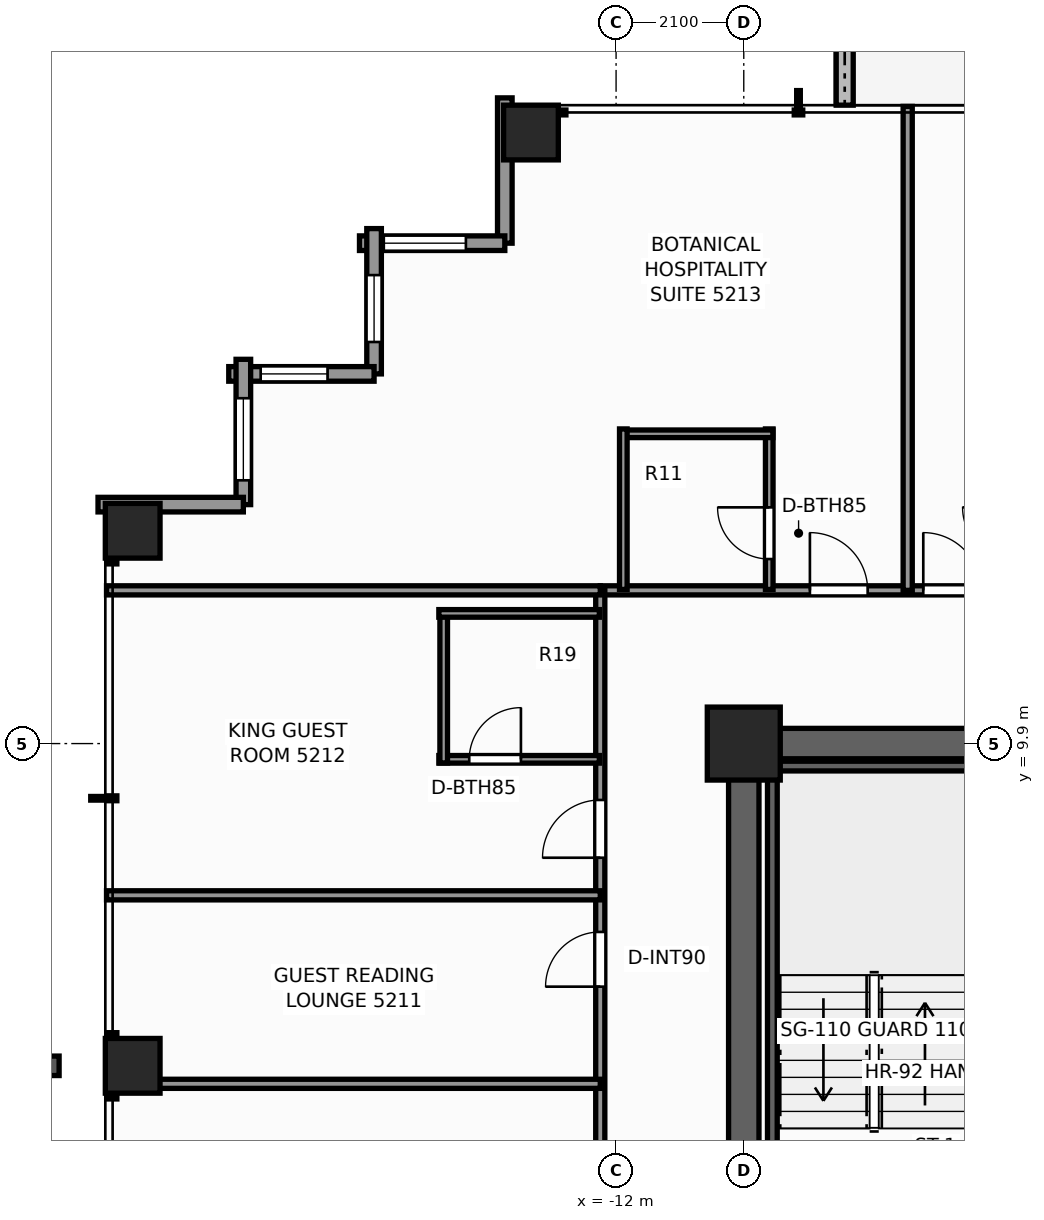
"""IFC4 building model, lengths in metres.
Left out: names, types, materials, properties, quantities, classifications, styles, units other than length and angle.
Written with IfcOpenShell. Run it as: python <this file> out.ifc"""

import sys

from ifc_helpers import new_model, si_unit, direction, frame, frame_2d, origin, origin_2d, place, context, subcontext, project, spatial, rectangle, extrude, element, fill, save


model = new_model("IFC4")
c1 = context("Model", 3, precision=1e-05, world=origin(), true_north=direction((0.0, 1.0)))
c2 = subcontext(c1, "Body", "Model", "MODEL_VIEW")
j1 = project(units=[si_unit("LENGTHUNIT", "METRE"), si_unit("PLANEANGLEUNIT", "RADIAN")], contexts=[c1])
p1 = place(None, origin())
s1 = spatial("IfcSite", under=j1, at=p1, CompositionType="ELEMENT")
p2 = place(p1, origin())
s2 = spatial("IfcBuilding", under=s1, at=p2, CompositionType="ELEMENT")
p3 = place(p2, frame((0.0, 0.0, 180.0)))
s3 = spatial("IfcBuildingStorey", under=s2, at=p3, CompositionType="ELEMENT", Elevation=180.0)
p4 = place(p3, frame((-10.15, 9.9, 0.0), z_axis=(0.0, 0.0, 1.0), x_axis=(1.0, 0.0, 0.0)))
e1 = element("IfcWall", 1, at=p4, inside=s3, PredefinedType="SHEAR", context=c2, shape_type="SweptSolid", body=[
    extrude(rectangle(XDim=14.57, YDim=0.5, at=frame_2d((7.285, 0.0))), origin(), (0.0, 0.0, 1.0), 3.3),
])
p5 = place(p3, frame((-9.9, -3.7, 0.0), z_axis=(0.0, 0.0, 1.0), x_axis=(0.0, 1.0, 0.0)))
e2 = element("IfcWall", 2, at=p5, inside=s3, PredefinedType="SHEAR", context=c2, shape_type="SweptSolid", body=[
    extrude(rectangle(XDim=13.35, YDim=0.5, at=frame_2d((6.675, 0.0))), origin(), (0.0, 0.0, 1.0), 3.3),
])
p6 = place(p5, frame((0.35, 0.0, 0.0)))
e3 = element("IfcOpeningElement", 3, at=p6, cuts=e2, PredefinedType="OPENING", context=c2, shape_type="SweptSolid", body=[
    extrude(rectangle(XDim=1.1, YDim=2.2, at=frame_2d((0.55, 1.1))), frame((0.0, 0.26, 0.0), z_axis=(0.0, -1.0, 0.0), x_axis=(1.0, 0.0, 0.0)), (0.0, 0.0, 1.0), 0.52),
])
p7 = place(p3, frame((-9.9, 9.9, 0.0), z_axis=(0.0, 0.0, 1.0), x_axis=(1.0, 0.0, 0.0)))
e4 = element("IfcColumn", 4, at=p7, inside=s3, PredefinedType="COLUMN", context=c2, shape_type="SweptSolid", body=[
    extrude(rectangle(XDim=1.2, YDim=1.2, at=origin_2d()), origin(), (0.0, 0.0, 1.0), 3.3),
])
for number, where, z_axis, x_axis in (
    (5, (-13.4, 19.95, 0.0), (0.0, 0.0, 1.0), (1.0, 0.0, 0.0)),
    (6, (-19.95, 4.6, 0.0), (0.0, 0.0, 1.0), (1.0, 0.0, 0.0)),
    (7, (-19.95, 13.4, 0.0), (0.0, 0.0, 1.0), (1.0, 0.0, 0.0)),
):
    element("IfcColumn", number, at=place(p3, frame(where, z_axis=z_axis, x_axis=x_axis)), inside=s3, PredefinedType="COLUMN", context=c2, shape_type="SweptSolid", body=[
        extrude(rectangle(XDim=0.9, YDim=0.9, at=origin_2d()), origin(), (0.0, 0.0, 1.0), 3.3),
    ])
p8 = place(p3, frame((-8.24, 23.375, -0.04), z_axis=(0.0, 0.0, 1.0), x_axis=(0.0, -1.0, 0.0)))
e8 = element("IfcWall", 8, at=p8, inside=s3, PredefinedType="PARAPET", context=c2, shape_type="SweptSolid", body=[
    extrude(rectangle(XDim=2.975, YDim=0.28, at=frame_2d((1.487, 0.0))), origin(), (0.0, 0.0, 1.0), 0.42),
])
p9 = place(p3, frame((-13.83, 18.13, 0.0), z_axis=(0.0, 0.0, 1.0), x_axis=(0.0, 1.0, 0.0)))
e9 = element("IfcWall", 9, at=p9, inside=s3, PredefinedType="STANDARD", context=c2, shape_type="SweptSolid", body=[
    extrude(rectangle(XDim=2.39, YDim=0.24, at=frame_2d((1.195, 0.0))), origin(), (0.0, 0.0, 1.0), 2.463),
])
p10 = place(p3, frame((-16.22, 18.13, 0.0), z_axis=(0.0, 0.0, 1.0), x_axis=(1.0, 0.0, 0.0)))
e10 = element("IfcWall", 10, at=p10, inside=s3, PredefinedType="STANDARD", context=c2, shape_type="SweptSolid", body=[
    extrude(rectangle(XDim=2.39, YDim=0.24, at=frame_2d((1.195, 0.0))), origin(), (0.0, 0.0, 1.0), 2.463),
])
p11 = place(p10, frame((0.4, 0.0, 0.65)))
e11 = element("IfcOpeningElement", 11, at=p11, cuts=e10, PredefinedType="OPENING", context=c2, shape_type="SweptSolid", body=[
    extrude(rectangle(XDim=1.35, YDim=1.55, at=frame_2d((0.675, 0.775))), frame((0.0, 0.13, 0.0), z_axis=(0.0, -1.0, 0.0), x_axis=(1.0, 0.0, 0.0)), (0.0, 0.0, 1.0), 0.26),
])
p12 = place(p3, frame((-15.98, 15.98, 0.0), z_axis=(0.0, 0.0, 1.0), x_axis=(0.0, 1.0, 0.0)))
e12 = element("IfcWall", 12, at=p12, inside=s3, PredefinedType="STANDARD", context=c2, shape_type="SweptSolid", body=[
    extrude(rectangle(XDim=2.39, YDim=0.24, at=frame_2d((1.195, 0.0))), origin(), (0.0, 0.0, 1.0), 2.463),
])
p13 = place(p12, frame((0.525, 0.0, 0.65)))
e13 = element("IfcOpeningElement", 13, at=p13, cuts=e12, PredefinedType="OPENING", context=c2, shape_type="SweptSolid", body=[
    extrude(rectangle(XDim=1.1, YDim=1.45, at=frame_2d((0.55, 0.725))), frame((0.0, 0.13, 0.0), z_axis=(0.0, -1.0, 0.0), x_axis=(1.0, 0.0, 0.0)), (0.0, 0.0, 1.0), 0.26),
])
p14 = place(p3, frame((-18.37, 15.98, 0.0), z_axis=(0.0, 0.0, 1.0), x_axis=(1.0, 0.0, 0.0)))
e14 = element("IfcWall", 14, at=p14, inside=s3, PredefinedType="STANDARD", context=c2, shape_type="SweptSolid", body=[
    extrude(rectangle(XDim=2.39, YDim=0.24, at=frame_2d((1.195, 0.0))), origin(), (0.0, 0.0, 1.0), 2.463),
])
p15 = place(p14, frame((0.525, 0.0, 0.65)))
e15 = element("IfcOpeningElement", 15, at=p15, cuts=e14, PredefinedType="OPENING", context=c2, shape_type="SweptSolid", body=[
    extrude(rectangle(XDim=1.1, YDim=1.45, at=frame_2d((0.55, 0.725))), frame((0.0, 0.13, 0.0), z_axis=(0.0, -1.0, 0.0), x_axis=(1.0, 0.0, 0.0)), (0.0, 0.0, 1.0), 0.26),
])
p16 = place(p3, frame((-18.13, 13.83, 0.0), z_axis=(0.0, 0.0, 1.0), x_axis=(0.0, 1.0, 0.0)))
e16 = element("IfcWall", 16, at=p16, inside=s3, PredefinedType="STANDARD", context=c2, shape_type="SweptSolid", body=[
    extrude(rectangle(XDim=2.39, YDim=0.24, at=frame_2d((1.195, 0.0))), origin(), (0.0, 0.0, 1.0), 2.463),
])
p17 = place(p16, frame((0.4, 0.0, 0.65)))
e17 = element("IfcOpeningElement", 17, at=p17, cuts=e16, PredefinedType="OPENING", context=c2, shape_type="SweptSolid", body=[
    extrude(rectangle(XDim=1.35, YDim=1.55, at=frame_2d((0.675, 0.775))), frame((0.0, 0.13, 0.0), z_axis=(0.0, -1.0, 0.0), x_axis=(1.0, 0.0, 0.0)), (0.0, 0.0, 1.0), 0.26),
])
p18 = place(p3, frame((-20.52, 13.83, 0.0), z_axis=(0.0, 0.0, 1.0), x_axis=(1.0, 0.0, 0.0)))
e18 = element("IfcWall", 18, at=p18, inside=s3, PredefinedType="STANDARD", context=c2, shape_type="SweptSolid", body=[
    extrude(rectangle(XDim=2.39, YDim=0.24, at=frame_2d((1.195, 0.0))), origin(), (0.0, 0.0, 1.0), 2.463),
])
p19 = place(p3, frame((-9.52, 9.53, 0.0), z_axis=(0.0, 0.0, 1.0), x_axis=(1.0, 0.0, 0.0)))
e19 = element("IfcWall", 19, at=p19, inside=s3, PredefinedType="SHEAR", context=c2, shape_type="SweptSolid", body=[
    extrude(rectangle(XDim=3.52, YDim=0.16, at=frame_2d((1.76, 0.0))), origin(), (0.0, 0.0, 1.0), 3.3),
])
p20 = place(p3, frame((-9.43, 1.97, 0.0), z_axis=(0.0, 0.0, 1.0), x_axis=(0.0, 1.0, 0.0)))
e20 = element("IfcWall", 20, at=p20, inside=s3, PredefinedType="SHEAR", context=c2, shape_type="SweptSolid", body=[
    extrude(rectangle(XDim=7.56, YDim=0.16, at=frame_2d((3.78, 0.0))), origin(), (0.0, 0.0, 1.0), 3.3),
])
p21 = place(p3, frame((-12.26, 12.42, 0.0), z_axis=(0.0, 0.0, 1.0), x_axis=(1.0, 0.0, 0.0)))
e21 = element("IfcWall", 21, at=p21, inside=s3, PredefinedType="PARTITIONING", context=c2, shape_type="SweptSolid", body=[
    extrude(rectangle(XDim=24.84, YDim=0.15, at=frame_2d((12.42, 0.0))), origin(), (0.0, 0.0, 1.0), 2.369),
])
p22 = place(p21, frame((3.448, 0.0, 0.0)))
e22 = element("IfcOpeningElement", 22, at=p22, cuts=e21, PredefinedType="OPENING", context=c2, shape_type="SweptSolid", body=[
    extrude(rectangle(XDim=0.95, YDim=2.06, at=frame_2d((0.475, 1.03))), frame((0.0, 0.085, 0.0), z_axis=(0.0, -1.0, 0.0), x_axis=(1.0, 0.0, 0.0)), (0.0, 0.0, 1.0), 0.17),
])
p23 = place(p21, frame((5.312, 0.0, 0.0)))
e23 = element("IfcOpeningElement", 23, at=p23, cuts=e21, PredefinedType="OPENING", context=c2, shape_type="SweptSolid", body=[
    extrude(rectangle(XDim=0.95, YDim=2.06, at=frame_2d((0.475, 1.03))), frame((0.0, 0.085, 0.0), z_axis=(0.0, -1.0, 0.0), x_axis=(1.0, 0.0, 0.0)), (0.0, 0.0, 1.0), 0.17),
])
p24 = place(p21, frame((13.906, 0.0, 0.0)))
e24 = element("IfcOpeningElement", 24, at=p24, cuts=e21, PredefinedType="OPENING", context=c2, shape_type="SweptSolid", body=[
    extrude(rectangle(XDim=0.95, YDim=2.06, at=frame_2d((0.475, 1.03))), frame((0.0, 0.085, 0.0), z_axis=(0.0, -1.0, 0.0), x_axis=(1.0, 0.0, 0.0)), (0.0, 0.0, 1.0), 0.17),
])
p25 = place(p21, frame((19.666, 0.0, 0.0)))
e25 = element("IfcOpeningElement", 25, at=p25, cuts=e21, PredefinedType="OPENING", context=c2, shape_type="SweptSolid", body=[
    extrude(rectangle(XDim=0.95, YDim=2.06, at=frame_2d((0.475, 1.03))), frame((0.0, 0.085, 0.0), z_axis=(0.0, -1.0, 0.0), x_axis=(1.0, 0.0, 0.0)), (0.0, 0.0, 1.0), 0.17),
])
p26 = place(p3, frame((-12.26, -12.42, 0.0), z_axis=(0.0, 0.0, 1.0), x_axis=(0.0, 1.0, 0.0)))
e26 = element("IfcWall", 26, at=p26, inside=s3, PredefinedType="PARTITIONING", context=c2, shape_type="SweptSolid", body=[
    extrude(rectangle(XDim=24.84, YDim=0.15, at=frame_2d((12.42, 0.0))), origin(), (0.0, 0.0, 1.0), 2.369),
])
p27 = place(p26, frame((4.41, 0.0, 0.0)))
e27 = element("IfcOpeningElement", 27, at=p27, cuts=e26, PredefinedType="OPENING", context=c2, shape_type="SweptSolid", body=[
    extrude(rectangle(XDim=0.95, YDim=2.06, at=frame_2d((0.475, 1.03))), frame((0.0, 0.085, 0.0), z_axis=(0.0, -1.0, 0.0), x_axis=(1.0, 0.0, 0.0)), (0.0, 0.0, 1.0), 0.17),
])
p28 = place(p26, frame((14.375, 0.0, 0.0)))
e28 = element("IfcOpeningElement", 28, at=p28, cuts=e26, PredefinedType="OPENING", context=c2, shape_type="SweptSolid", body=[
    extrude(rectangle(XDim=0.95, YDim=2.06, at=frame_2d((0.475, 1.03))), frame((0.0, 0.085, 0.0), z_axis=(0.0, -1.0, 0.0), x_axis=(1.0, 0.0, 0.0)), (0.0, 0.0, 1.0), 0.17),
])
p29 = place(p26, frame((18.322, 0.0, 0.0)))
e29 = element("IfcOpeningElement", 29, at=p29, cuts=e26, PredefinedType="OPENING", context=c2, shape_type="SweptSolid", body=[
    extrude(rectangle(XDim=0.9, YDim=2.06, at=frame_2d((0.45, 1.03))), frame((0.0, 0.085, 0.0), z_axis=(0.0, -1.0, 0.0), x_axis=(1.0, 0.0, 0.0)), (0.0, 0.0, 1.0), 0.17),
])
p30 = place(p26, frame((20.442, 0.0, 0.0)))
e30 = element("IfcOpeningElement", 30, at=p30, cuts=e26, PredefinedType="OPENING", context=c2, shape_type="SweptSolid", body=[
    extrude(rectangle(XDim=0.95, YDim=2.06, at=frame_2d((0.475, 1.03))), frame((0.0, 0.085, 0.0), z_axis=(0.0, -1.0, 0.0), x_axis=(1.0, 0.0, 0.0)), (0.0, 0.0, 1.0), 0.17),
])
p31 = place(p3, frame((-20.38, 12.42, 0.0), z_axis=(0.0, 0.0, 1.0), x_axis=(1.0, 0.0, 0.0)))
e31 = element("IfcWall", 31, at=p31, inside=s3, PredefinedType="PARTITIONING", context=c2, shape_type="SweptSolid", body=[
    extrude(rectangle(XDim=8.12, YDim=0.15, at=frame_2d((4.06, 0.0))), origin(), (0.0, 0.0, 1.0), 2.369),
])
for number, where, z_axis, x_axis in (
    (32, (-20.38, 4.304, 0.0), (0.0, 0.0, 1.0), (1.0, 0.0, 0.0)),
    (33, (-20.38, 7.404, 0.0), (0.0, 0.0, 1.0), (1.0, 0.0, 0.0)),
):
    element("IfcWall", number, at=place(p3, frame(where, z_axis=z_axis, x_axis=x_axis)), inside=s3, PredefinedType="PARTITIONING", context=c2, shape_type="SweptSolid", body=[
        extrude(rectangle(XDim=8.12, YDim=0.15, at=frame_2d((4.06, 0.0))), origin(), (0.0, 0.0, 1.0), 2.453),
    ])
p32 = place(p3, frame((-14.915, 9.641, 0.0), z_axis=(0.0, 0.0, 1.0), x_axis=(1.0, 0.0, 0.0)))
e34 = element("IfcWall", 34, at=p32, inside=s3, PredefinedType="PARTITIONING", context=c2, shape_type="SweptSolid", body=[
    extrude(rectangle(XDim=2.64, YDim=0.125, at=frame_2d((1.32, 0.0))), origin(), (0.0, 0.0, 1.0), 3.08),
])
p33 = place(p32, frame((0.5, 0.0, 0.0)))
e35 = element("IfcOpeningElement", 35, at=p33, cuts=e34, PredefinedType="OPENING", context=c2, shape_type="SweptSolid", body=[
    extrude(rectangle(XDim=0.85, YDim=2.03, at=frame_2d((0.425, 1.015))), frame((0.0, 0.073, 0.0), z_axis=(0.0, -1.0, 0.0), x_axis=(1.0, 0.0, 0.0)), (0.0, 0.0, 1.0), 0.145),
])
p34 = place(p3, frame((-14.835, 9.581, 0.0), z_axis=(0.0, 0.0, 1.0), x_axis=(0.0, 1.0, 0.0)))
e36 = element("IfcWall", 36, at=p34, inside=s3, PredefinedType="PARTITIONING", context=c2, shape_type="SweptSolid", body=[
    extrude(rectangle(XDim=2.52, YDim=0.125, at=frame_2d((1.26, 0.0))), origin(), (0.0, 0.0, 1.0), 2.369),
])
p35 = place(p3, frame((-14.915, 12.041, 0.0), z_axis=(0.0, 0.0, 1.0), x_axis=(1.0, 0.0, 0.0)))
e37 = element("IfcWall", 37, at=p35, inside=s3, PredefinedType="PARTITIONING", context=c2, shape_type="SweptSolid", body=[
    extrude(rectangle(XDim=2.64, YDim=0.125, at=frame_2d((1.32, 0.0))), origin(), (0.0, 0.0, 1.0), 3.08),
])
p36 = place(p3, frame((-7.204, 12.42, 0.0), z_axis=(0.0, 0.0, 1.0), x_axis=(0.0, 1.0, 0.0)))
e38 = element("IfcWall", 38, at=p36, inside=s3, PredefinedType="PARTITIONING", context=c2, shape_type="SweptSolid", body=[
    extrude(rectangle(XDim=7.96, YDim=0.15, at=frame_2d((3.98, 0.0))), origin(), (0.0, 0.0, 1.0), 2.453),
])
p37 = place(p3, frame((-9.481, 12.435, 0.0), z_axis=(0.0, 0.0, 1.0), x_axis=(0.0, 1.0, 0.0)))
e39 = element("IfcWall", 39, at=p37, inside=s3, PredefinedType="PARTITIONING", context=c2, shape_type="SweptSolid", body=[
    extrude(rectangle(XDim=2.64, YDim=0.125, at=frame_2d((1.32, 0.0))), origin(), (0.0, 0.0, 1.0), 3.08),
])
p38 = place(p37, frame((0.5, 0.0, 0.0)))
e40 = element("IfcOpeningElement", 40, at=p38, cuts=e39, PredefinedType="OPENING", context=c2, shape_type="SweptSolid", body=[
    extrude(rectangle(XDim=0.85, YDim=2.03, at=frame_2d((0.425, 1.015))), frame((0.0, 0.073, 0.0), z_axis=(0.0, -1.0, 0.0), x_axis=(1.0, 0.0, 0.0)), (0.0, 0.0, 1.0), 0.145),
])
p39 = place(p3, frame((-11.941, 14.995, 0.0), z_axis=(0.0, 0.0, 1.0), x_axis=(1.0, 0.0, 0.0)))
e41 = element("IfcWall", 41, at=p39, inside=s3, PredefinedType="PARTITIONING", context=c2, shape_type="SweptSolid", body=[
    extrude(rectangle(XDim=2.52, YDim=0.125, at=frame_2d((1.26, 0.0))), origin(), (0.0, 0.0, 1.0), 2.369),
])
p40 = place(p3, frame((-11.881, 12.435, 0.0), z_axis=(0.0, 0.0, 1.0), x_axis=(0.0, 1.0, 0.0)))
e42 = element("IfcWall", 42, at=p40, inside=s3, PredefinedType="PARTITIONING", context=c2, shape_type="SweptSolid", body=[
    extrude(rectangle(XDim=2.64, YDim=0.125, at=frame_2d((1.32, 0.0))), origin(), (0.0, 0.0, 1.0), 2.369),
])
p41 = place(p11, origin())
e43 = element("IfcWindow", 43, at=p41, inside=s3, PartitioningType="SINGLE_PANEL", PredefinedType="WINDOW", context=c2, shape_type="SweptSolid", body=[
    extrude(rectangle(XDim=1.35, YDim=1.55, at=frame_2d((0.675, 0.775))), frame((0.0, 0.03, 0.0), z_axis=(0.0, -1.0, 0.0), x_axis=(1.0, 0.0, 0.0)), (0.0, 0.0, 1.0), 0.06),
])
fill(e11, e43)
p42 = place(p13, origin())
e44 = element("IfcWindow", 44, at=p42, inside=s3, PartitioningType="SINGLE_PANEL", PredefinedType="WINDOW", context=c2, shape_type="SweptSolid", body=[
    extrude(rectangle(XDim=1.1, YDim=1.45, at=frame_2d((0.55, 0.725))), frame((0.0, 0.03, 0.0), z_axis=(0.0, -1.0, 0.0), x_axis=(1.0, 0.0, 0.0)), (0.0, 0.0, 1.0), 0.06),
])
fill(e13, e44)
p43 = place(p15, origin())
e45 = element("IfcWindow", 45, at=p43, inside=s3, PartitioningType="SINGLE_PANEL", PredefinedType="WINDOW", context=c2, shape_type="SweptSolid", body=[
    extrude(rectangle(XDim=1.1, YDim=1.45, at=frame_2d((0.55, 0.725))), frame((0.0, 0.03, 0.0), z_axis=(0.0, -1.0, 0.0), x_axis=(1.0, 0.0, 0.0)), (0.0, 0.0, 1.0), 0.06),
])
fill(e15, e45)
p44 = place(p17, origin())
e46 = element("IfcWindow", 46, at=p44, inside=s3, PartitioningType="SINGLE_PANEL", PredefinedType="WINDOW", context=c2, shape_type="SweptSolid", body=[
    extrude(rectangle(XDim=1.35, YDim=1.55, at=frame_2d((0.675, 0.775))), frame((0.0, 0.03, 0.0), z_axis=(0.0, -1.0, 0.0), x_axis=(1.0, 0.0, 0.0)), (0.0, 0.0, 1.0), 0.06),
])
fill(e17, e46)
p45 = place(p29, origin())
e47 = element("IfcDoor", 47, at=p45, inside=s3, OperationType="SINGLE_SWING_LEFT", PredefinedType="DOOR", context=c2, shape_type="SweptSolid", body=[
    extrude(rectangle(XDim=0.9, YDim=2.06, at=frame_2d((0.45, 1.03))), frame((0.0, 0.025, 0.0), z_axis=(0.0, -1.0, 0.0), x_axis=(1.0, 0.0, 0.0)), (0.0, 0.0, 1.0), 0.05),
])
fill(e29, e47)
p46 = place(p33, origin())
e48 = element("IfcDoor", 48, at=p46, inside=s3, OperationType="SINGLE_SWING_RIGHT", PredefinedType="DOOR", context=c2, shape_type="SweptSolid", body=[
    extrude(rectangle(XDim=0.85, YDim=2.03, at=frame_2d((0.425, 1.015))), frame((0.0, 0.025, 0.0), z_axis=(0.0, -1.0, 0.0), x_axis=(1.0, 0.0, 0.0)), (0.0, 0.0, 1.0), 0.05),
])
fill(e35, e48)
p47 = place(p30, origin())
e49 = element("IfcDoor", 49, at=p47, inside=s3, OperationType="SINGLE_SWING_LEFT", PredefinedType="DOOR", context=c2, shape_type="SweptSolid", body=[
    extrude(rectangle(XDim=0.95, YDim=2.06, at=frame_2d((0.475, 1.03))), frame((0.0, 0.025, 0.0), z_axis=(0.0, -1.0, 0.0), x_axis=(1.0, 0.0, 0.0)), (0.0, 0.0, 1.0), 0.05),
])
fill(e30, e49)
p48 = place(p38, origin())
e50 = element("IfcDoor", 50, at=p48, inside=s3, OperationType="SINGLE_SWING_RIGHT", PredefinedType="DOOR", context=c2, shape_type="SweptSolid", body=[
    extrude(rectangle(XDim=0.85, YDim=2.03, at=frame_2d((0.425, 1.015))), frame((0.0, 0.025, 0.0), z_axis=(0.0, -1.0, 0.0), x_axis=(1.0, 0.0, 0.0)), (0.0, 0.0, 1.0), 0.05),
])
fill(e40, e50)
p49 = place(p22, origin())
e51 = element("IfcDoor", 51, at=p49, inside=s3, OperationType="SINGLE_SWING_LEFT", PredefinedType="DOOR", context=c2, shape_type="SweptSolid", body=[
    extrude(rectangle(XDim=0.95, YDim=2.06, at=frame_2d((0.475, 1.03))), frame((0.0, 0.025, 0.0), z_axis=(0.0, -1.0, 0.0), x_axis=(1.0, 0.0, 0.0)), (0.0, 0.0, 1.0), 0.05),
])
fill(e22, e51)
p50 = place(p23, origin())
e52 = element("IfcDoor", 52, at=p50, inside=s3, OperationType="SINGLE_SWING_LEFT", PredefinedType="DOOR", context=c2, shape_type="SweptSolid", body=[
    extrude(rectangle(XDim=0.95, YDim=2.06, at=frame_2d((0.475, 1.03))), frame((0.0, 0.025, 0.0), z_axis=(0.0, -1.0, 0.0), x_axis=(1.0, 0.0, 0.0)), (0.0, 0.0, 1.0), 0.05),
])
fill(e23, e52)
save(model, sys.argv[1])
